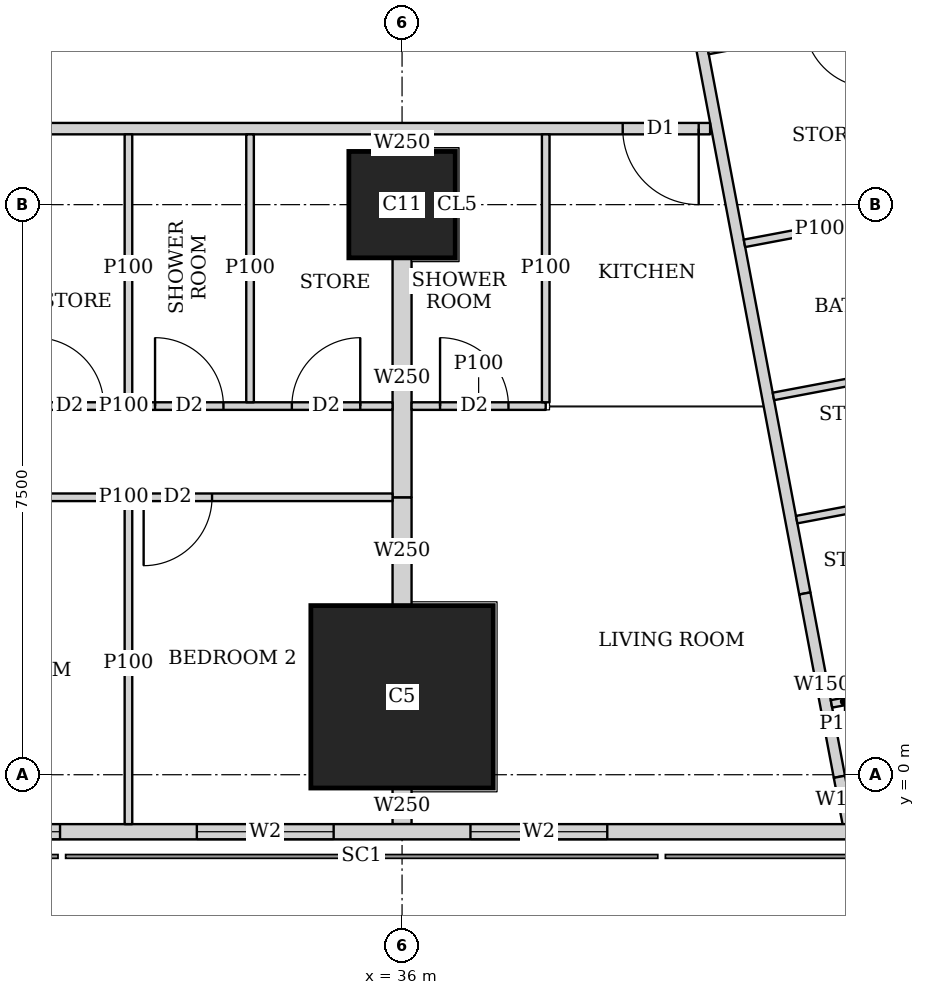
"""IFC4 building model, lengths in metres.
Left out: names, types, materials, properties, quantities, classifications, styles, units other than length and angle.
Written with IfcOpenShell. Run it as: python <this file> out.ifc"""

import sys

from ifc_helpers import new_model, si_unit, direction, frame, frame_2d, origin, origin_2d, place, context, subcontext, project, spatial, rectangle, extrude, element, fill, save


model = new_model("IFC4")
c1 = context("Model", 3, precision=1e-05, world=origin(), true_north=direction((0.0, 1.0)))
c2 = subcontext(c1, "Body", "Model", "MODEL_VIEW")
j1 = project(units=[si_unit("LENGTHUNIT", "METRE"), si_unit("PLANEANGLEUNIT", "RADIAN")], contexts=[c1])
p1 = place(None, origin())
s1 = spatial("IfcSite", under=j1, at=p1, CompositionType="ELEMENT")
p2 = place(p1, origin())
s2 = spatial("IfcBuilding", under=s1, at=p2, CompositionType="ELEMENT")
p3 = place(p2, frame((0.0, 0.0, 204.95)))
s3 = spatial("IfcBuildingStorey", under=s2, at=p3, CompositionType="ELEMENT", Elevation=204.95)
p4 = place(p3, frame((36.0, 1.025, 0.0), z_axis=(0.0, 0.0, 1.0), x_axis=(1.0, 0.0, 0.0)))
e1 = element("IfcColumn", 1, at=p4, inside=s3, PredefinedType="COLUMN", context=c2, shape_type="SweptSolid", body=[
    extrude(rectangle(XDim=2.4, YDim=2.4, at=origin_2d()), origin(), (0.0, 0.0, 1.0), 3.75),
])
p5 = place(p3, frame((36.0, 7.5, 0.0), z_axis=(0.0, 0.0, 1.0), x_axis=(1.0, 0.0, 0.0)))
e2 = element("IfcColumn", 2, at=p5, inside=s3, PredefinedType="COLUMN", context=c2, shape_type="SweptSolid", body=[
    extrude(rectangle(XDim=1.4, YDim=1.4, at=origin_2d()), origin(), (0.0, 0.0, 1.0), 3.75),
])
p6 = place(p3, frame((7.363, -0.75, 0.0), z_axis=(0.0, 0.0, 1.0), x_axis=(1.0, 0.0, 0.0)))
e3 = element("IfcWall", 3, at=p6, inside=s3, PredefinedType="SOLIDWALL", context=c2, shape_type="SweptSolid", body=[
    extrude(rectangle(XDim=40.428, YDim=0.2, at=frame_2d((20.214, 0.0))), origin(), (0.0, 0.0, 1.0), 3.5),
])
p7 = place(p6, frame((2.319, 0.0, 0.9)))
e4 = element("IfcOpeningElement", 4, at=p7, cuts=e3, PredefinedType="OPENING", context=c2, shape_type="SweptSolid", body=[
    extrude(rectangle(XDim=2.4, YDim=1.5, at=frame_2d((1.2, 0.75))), frame((0.0, 0.11, 0.0), z_axis=(0.0, -1.0, 0.0), x_axis=(1.0, 0.0, 0.0)), (0.0, 0.0, 1.0), 0.22),
])
p8 = place(p6, frame((7.937, 0.0, 0.9)))
e5 = element("IfcOpeningElement", 5, at=p8, cuts=e3, PredefinedType="OPENING", context=c2, shape_type="SweptSolid", body=[
    extrude(rectangle(XDim=1.8, YDim=1.5, at=frame_2d((0.9, 0.75))), frame((0.0, 0.11, 0.0), z_axis=(0.0, -1.0, 0.0), x_axis=(1.0, 0.0, 0.0)), (0.0, 0.0, 1.0), 0.22),
])
p9 = place(p6, frame((11.537, 0.0, 0.9)))
e6 = element("IfcOpeningElement", 6, at=p9, cuts=e3, PredefinedType="OPENING", context=c2, shape_type="SweptSolid", body=[
    extrude(rectangle(XDim=1.8, YDim=1.5, at=frame_2d((0.9, 0.75))), frame((0.0, 0.11, 0.0), z_axis=(0.0, -1.0, 0.0), x_axis=(1.0, 0.0, 0.0)), (0.0, 0.0, 1.0), 0.22),
])
p10 = place(p6, frame((15.137, 0.0, 0.9)))
e7 = element("IfcOpeningElement", 7, at=p10, cuts=e3, PredefinedType="OPENING", context=c2, shape_type="SweptSolid", body=[
    extrude(rectangle(XDim=1.8, YDim=1.5, at=frame_2d((0.9, 0.75))), frame((0.0, 0.11, 0.0), z_axis=(0.0, -1.0, 0.0), x_axis=(1.0, 0.0, 0.0)), (0.0, 0.0, 1.0), 0.22),
])
p11 = place(p6, frame((18.737, 0.0, 0.9)))
e8 = element("IfcOpeningElement", 8, at=p11, cuts=e3, PredefinedType="OPENING", context=c2, shape_type="SweptSolid", body=[
    extrude(rectangle(XDim=1.8, YDim=1.5, at=frame_2d((0.9, 0.75))), frame((0.0, 0.11, 0.0), z_axis=(0.0, -1.0, 0.0), x_axis=(1.0, 0.0, 0.0)), (0.0, 0.0, 1.0), 0.22),
])
p12 = place(p6, frame((22.337, 0.0, 0.9)))
e9 = element("IfcOpeningElement", 9, at=p12, cuts=e3, PredefinedType="OPENING", context=c2, shape_type="SweptSolid", body=[
    extrude(rectangle(XDim=1.8, YDim=1.5, at=frame_2d((0.9, 0.75))), frame((0.0, 0.11, 0.0), z_axis=(0.0, -1.0, 0.0), x_axis=(1.0, 0.0, 0.0)), (0.0, 0.0, 1.0), 0.22),
])
p13 = place(p6, frame((25.937, 0.0, 0.9)))
e10 = element("IfcOpeningElement", 10, at=p13, cuts=e3, PredefinedType="OPENING", context=c2, shape_type="SweptSolid", body=[
    extrude(rectangle(XDim=1.8, YDim=1.5, at=frame_2d((0.9, 0.75))), frame((0.0, 0.11, 0.0), z_axis=(0.0, -1.0, 0.0), x_axis=(1.0, 0.0, 0.0)), (0.0, 0.0, 1.0), 0.22),
])
p14 = place(p6, frame((29.537, 0.0, 0.9)))
e11 = element("IfcOpeningElement", 11, at=p14, cuts=e3, PredefinedType="OPENING", context=c2, shape_type="SweptSolid", body=[
    extrude(rectangle(XDim=1.8, YDim=1.5, at=frame_2d((0.9, 0.75))), frame((0.0, 0.11, 0.0), z_axis=(0.0, -1.0, 0.0), x_axis=(1.0, 0.0, 0.0)), (0.0, 0.0, 1.0), 0.22),
])
p15 = place(p3, frame((40.053, 8.5, 0.0), z_axis=(0.0, 0.0, 1.0), x_axis=(-1.0, 0.0, 0.0)))
e12 = element("IfcWall", 12, at=p15, inside=s3, PredefinedType="SOLIDWALL", context=c2, shape_type="SweptSolid", body=[
    extrude(rectangle(XDim=31.052, YDim=0.15, at=frame_2d((15.526, 0.0))), origin(), (0.0, 0.0, 1.0), 3.5),
])
p16 = place(p15, frame((29.178, 0.0, 0.0)))
e13 = element("IfcOpeningElement", 13, at=p16, cuts=e12, PredefinedType="OPENING", context=c2, shape_type="SweptSolid", body=[
    extrude(rectangle(XDim=1.0, YDim=2.1, at=frame_2d((0.5, 1.05))), frame((0.0, 0.085, 0.0), z_axis=(0.0, -1.0, 0.0), x_axis=(1.0, 0.0, 0.0)), (0.0, 0.0, 1.0), 0.17),
])
p17 = place(p15, frame((19.953, 0.0, 0.0)))
e14 = element("IfcOpeningElement", 14, at=p17, cuts=e12, PredefinedType="OPENING", context=c2, shape_type="SweptSolid", body=[
    extrude(rectangle(XDim=1.0, YDim=2.1, at=frame_2d((0.5, 1.05))), frame((0.0, 0.085, 0.0), z_axis=(0.0, -1.0, 0.0), x_axis=(1.0, 0.0, 0.0)), (0.0, 0.0, 1.0), 0.17),
])
p18 = place(p15, frame((12.753, 0.0, 0.0)))
e15 = element("IfcOpeningElement", 15, at=p18, cuts=e12, PredefinedType="OPENING", context=c2, shape_type="SweptSolid", body=[
    extrude(rectangle(XDim=1.0, YDim=2.1, at=frame_2d((0.5, 1.05))), frame((0.0, 0.085, 0.0), z_axis=(0.0, -1.0, 0.0), x_axis=(1.0, 0.0, 0.0)), (0.0, 0.0, 1.0), 0.17),
])
p19 = place(p15, frame((0.15, 0.0, 0.0)))
e16 = element("IfcOpeningElement", 16, at=p19, cuts=e12, PredefinedType="OPENING", context=c2, shape_type="SweptSolid", body=[
    extrude(rectangle(XDim=1.0, YDim=2.1, at=frame_2d((0.5, 1.05))), frame((0.0, 0.085, 0.0), z_axis=(0.0, -1.0, 0.0), x_axis=(1.0, 0.0, 0.0)), (0.0, 0.0, 1.0), 0.17),
])
p20 = place(p3, frame((33.68, 42.723, 0.0), z_axis=(0.0, 0.0, 1.0), x_axis=(0.185601160014, -0.982625162207, 0.0)))
e17 = element("IfcWall", 17, at=p20, inside=s3, PredefinedType="SOLIDWALL", context=c2, shape_type="SweptSolid", body=[
    extrude(rectangle(XDim=41.051, YDim=0.15, at=frame_2d((20.526, 0.0))), origin(), (0.0, 0.0, 1.0), 2.5),
])
p21 = place(p20, frame((12.307, 0.0, 0.0)))
e18 = element("IfcOpeningElement", 18, at=p21, cuts=e17, PredefinedType="OPENING", context=c2, shape_type="SweptSolid", body=[
    extrude(rectangle(XDim=1.0, YDim=2.1, at=frame_2d((0.5, 1.05))), frame((0.0, 0.085, 0.0), z_axis=(0.0, -1.0, 0.0), x_axis=(1.0, 0.0, 0.0)), (0.0, 0.0, 1.0), 0.17),
])
p22 = place(p20, frame((16.123, 0.0, 0.0)))
e19 = element("IfcOpeningElement", 19, at=p22, cuts=e17, PredefinedType="OPENING", context=c2, shape_type="SweptSolid", body=[
    extrude(rectangle(XDim=1.0, YDim=2.1, at=frame_2d((0.5, 1.05))), frame((0.0, 0.085, 0.0), z_axis=(0.0, -1.0, 0.0), x_axis=(1.0, 0.0, 0.0)), (0.0, 0.0, 1.0), 0.17),
])
p23 = place(p20, frame((30.902, 0.0, 0.0)))
e20 = element("IfcOpeningElement", 20, at=p23, cuts=e17, PredefinedType="OPENING", context=c2, shape_type="SweptSolid", body=[
    extrude(rectangle(XDim=1.0, YDim=2.1, at=frame_2d((0.5, 1.05))), frame((0.0, 0.085, 0.0), z_axis=(0.0, -1.0, 0.0), x_axis=(1.0, 0.0, 0.0)), (0.0, 0.0, 1.0), 0.17),
])
p24 = place(p3, frame((41.299, 2.385, 0.0), z_axis=(0.0, 0.0, 1.0), x_axis=(0.18529731833, -0.982682504077, 0.0)))
e21 = element("IfcWall", 21, at=p24, inside=s3, PredefinedType="SOLIDWALL", context=c2, shape_type="SweptSolid", body=[
    extrude(rectangle(XDim=2.455, YDim=0.15, at=frame_2d((1.227, 0.0))), origin(), (0.0, 0.0, 1.0), 2.05),
])
p25 = place(p3, frame((41.754, -0.027, 0.0), z_axis=(0.0, 0.0, 1.0), x_axis=(0.186404157015, -0.982473149886, 0.0)))
e22 = element("IfcWall", 22, at=p25, inside=s3, PredefinedType="SOLIDWALL", context=c2, shape_type="SweptSolid", body=[
    extrude(rectangle(XDim=0.634, YDim=0.15, at=frame_2d((0.317, 0.0))), origin(), (0.0, 0.0, 1.0), 3.5),
])
p26 = place(p3, frame((35.875, 3.65, 0.0), z_axis=(0.0, 0.0, 1.0), x_axis=(-1.0, 0.0, 0.0)))
e23 = element("IfcWall", 23, at=p26, inside=s3, PredefinedType="PARTITIONING", context=c2, shape_type="SweptSolid", body=[
    extrude(rectangle(XDim=7.075, YDim=0.1, at=frame_2d((3.538, 0.0))), origin(), (0.0, 0.0, 1.0), 3.5),
])
p27 = place(p26, frame((4.95, 0.0, 0.0)))
e24 = element("IfcOpeningElement", 24, at=p27, cuts=e23, PredefinedType="OPENING", context=c2, shape_type="SweptSolid", body=[
    extrude(rectangle(XDim=0.9, YDim=2.1, at=frame_2d((0.45, 1.05))), frame((0.0, 0.06, 0.0), z_axis=(0.0, -1.0, 0.0), x_axis=(1.0, 0.0, 0.0)), (0.0, 0.0, 1.0), 0.12),
])
p28 = place(p26, frame((2.375, 0.0, 0.0)))
e25 = element("IfcOpeningElement", 25, at=p28, cuts=e23, PredefinedType="OPENING", context=c2, shape_type="SweptSolid", body=[
    extrude(rectangle(XDim=0.9, YDim=2.1, at=frame_2d((0.45, 1.05))), frame((0.0, 0.06, 0.0), z_axis=(0.0, -1.0, 0.0), x_axis=(1.0, 0.0, 0.0)), (0.0, 0.0, 1.0), 0.12),
])
p29 = place(p3, frame((35.875, 4.85, 0.0), z_axis=(0.0, 0.0, 1.0), x_axis=(-1.0, 0.0, 0.0)))
e26 = element("IfcWall", 26, at=p29, inside=s3, PredefinedType="PARTITIONING", context=c2, shape_type="SweptSolid", body=[
    extrude(rectangle(XDim=7.075, YDim=0.1, at=frame_2d((3.538, 0.0))), origin(), (0.0, 0.0, 1.0), 3.5),
])
p30 = place(p29, frame((5.6, 0.0, 0.0)))
e27 = element("IfcOpeningElement", 27, at=p30, cuts=e26, PredefinedType="OPENING", context=c2, shape_type="SweptSolid", body=[
    extrude(rectangle(XDim=0.9, YDim=2.1, at=frame_2d((0.45, 1.05))), frame((0.0, 0.06, 0.0), z_axis=(0.0, -1.0, 0.0), x_axis=(1.0, 0.0, 0.0)), (0.0, 0.0, 1.0), 0.12),
])
p31 = place(p29, frame((2.225, 0.0, 0.0)))
e28 = element("IfcOpeningElement", 28, at=p31, cuts=e26, PredefinedType="OPENING", context=c2, shape_type="SweptSolid", body=[
    extrude(rectangle(XDim=0.9, YDim=2.1, at=frame_2d((0.45, 1.05))), frame((0.0, 0.06, 0.0), z_axis=(0.0, -1.0, 0.0), x_axis=(1.0, 0.0, 0.0)), (0.0, 0.0, 1.0), 0.12),
])
p32 = place(p29, frame((3.8, 0.0, 0.0)))
e29 = element("IfcOpeningElement", 29, at=p32, cuts=e26, PredefinedType="OPENING", context=c2, shape_type="SweptSolid", body=[
    extrude(rectangle(XDim=0.9, YDim=2.1, at=frame_2d((0.45, 1.05))), frame((0.0, 0.06, 0.0), z_axis=(0.0, -1.0, 0.0), x_axis=(1.0, 0.0, 0.0)), (0.0, 0.0, 1.0), 0.12),
])
p33 = place(p29, frame((0.425, 0.0, 0.0)))
e30 = element("IfcOpeningElement", 30, at=p33, cuts=e26, PredefinedType="OPENING", context=c2, shape_type="SweptSolid", body=[
    extrude(rectangle(XDim=0.9, YDim=2.1, at=frame_2d((0.45, 1.05))), frame((0.0, 0.06, 0.0), z_axis=(0.0, -1.0, 0.0), x_axis=(1.0, 0.0, 0.0)), (0.0, 0.0, 1.0), 0.12),
])
p34 = place(p3, frame((32.4, -0.65, 0.0), z_axis=(0.0, 0.0, 1.0), x_axis=(0.0, 1.0, 0.0)))
e31 = element("IfcWall", 31, at=p34, inside=s3, PredefinedType="PARTITIONING", context=c2, shape_type="SweptSolid", body=[
    extrude(rectangle(XDim=4.25, YDim=0.1, at=frame_2d((2.125, 0.0))), origin(), (0.0, 0.0, 1.0), 2.05),
])
for number, where, z_axis, x_axis in (
    (32, (32.4, 4.9, 0.0), (0.0, 0.0, 1.0), (0.0, 1.0, 0.0)),
    (33, (34.0, 4.9, 0.0), (0.0, 0.0, 1.0), (0.0, 1.0, 0.0)),
):
    element("IfcWall", number, at=place(p3, frame(where, z_axis=z_axis, x_axis=x_axis)), inside=s3, PredefinedType="PARTITIONING", context=c2, shape_type="SweptSolid", body=[
        extrude(rectangle(XDim=3.525, YDim=0.1, at=frame_2d((1.763, 0.0))), origin(), (0.0, 0.0, 1.0), 3.5),
    ])
p35 = place(p3, frame((37.89, 4.85, 0.0), z_axis=(0.0, 0.0, 1.0), x_axis=(-1.0, 0.0, 0.0)))
e34 = element("IfcWall", 34, at=p35, inside=s3, PredefinedType="PARTITIONING", context=c2, shape_type="SweptSolid", body=[
    extrude(rectangle(XDim=1.765, YDim=0.1, at=frame_2d((0.882, 0.0))), origin(), (0.0, 0.0, 1.0), 3.5),
])
p36 = place(p35, frame((0.49, 0.0, 0.0)))
e35 = element("IfcOpeningElement", 35, at=p36, cuts=e34, PredefinedType="OPENING", context=c2, shape_type="SweptSolid", body=[
    extrude(rectangle(XDim=0.9, YDim=2.1, at=frame_2d((0.45, 1.05))), frame((0.0, 0.06, 0.0), z_axis=(0.0, -1.0, 0.0), x_axis=(1.0, 0.0, 0.0)), (0.0, 0.0, 1.0), 0.12),
])
p37 = place(p3, frame((37.89, 4.9, 0.0), z_axis=(0.0, 0.0, 1.0), x_axis=(0.0, 1.0, 0.0)))
e36 = element("IfcWall", 36, at=p37, inside=s3, PredefinedType="PARTITIONING", context=c2, shape_type="SweptSolid", body=[
    extrude(rectangle(XDim=3.525, YDim=0.1, at=frame_2d((1.763, 0.0))), origin(), (0.0, 0.0, 1.0), 3.5),
])
p38 = place(p3, frame((36.0, -0.65, 0.0), z_axis=(0.0, 0.0, 1.0), x_axis=(0.0, 1.0, 0.0)))
e37 = element("IfcWall", 37, at=p38, inside=s3, PredefinedType="SOLIDWALL", context=c2, shape_type="SweptSolid", body=[
    extrude(rectangle(XDim=0.474, YDim=0.25, at=frame_2d((0.237, 0.0))), origin(), (0.0, 0.0, 1.0), 2.05),
])
p39 = place(p3, frame((36.0, 2.226, 0.0), z_axis=(0.0, 0.0, 1.0), x_axis=(0.0, 1.0, 0.0)))
e38 = element("IfcWall", 38, at=p39, inside=s3, PredefinedType="SOLIDWALL", context=c2, shape_type="SweptSolid", body=[
    extrude(rectangle(XDim=1.424, YDim=0.25, at=frame_2d((0.712, 0.0))), origin(), (0.0, 0.0, 1.0), 2.05),
])
p40 = place(p3, frame((36.0, 3.65, 0.0), z_axis=(0.0, 0.0, 1.0), x_axis=(0.0, 1.0, 0.0)))
e39 = element("IfcWall", 39, at=p40, inside=s3, PredefinedType="SOLIDWALL", context=c2, shape_type="SweptSolid", body=[
    extrude(rectangle(XDim=3.149, YDim=0.25, at=frame_2d((1.575, 0.0))), origin(), (0.0, 0.0, 1.0), 3.5),
])
p41 = place(p3, frame((36.0, 8.201, 0.0), z_axis=(0.0, 0.0, 1.0), x_axis=(0.0, 1.0, 0.0)))
e40 = element("IfcWall", 40, at=p41, inside=s3, PredefinedType="SOLIDWALL", context=c2, shape_type="SweptSolid", body=[
    extrude(rectangle(XDim=0.224, YDim=0.25, at=frame_2d((0.112, 0.0))), origin(), (0.0, 0.0, 1.0), 3.5),
])
p42 = place(p3, frame((43.49, 10.183, 0.0), z_axis=(0.0, 0.0, 1.0), x_axis=(-0.982588017646, -0.185797706064, 0.0)))
e41 = element("IfcWall", 41, at=p42, inside=s3, PredefinedType="PARTITIONING", context=c2, shape_type="SweptSolid", body=[
    extrude(rectangle(XDim=3.525, YDim=0.1, at=frame_2d((1.763, 0.0))), origin(), (0.0, 0.0, 1.0), 3.5),
])
p43 = place(p42, frame((1.325, 0.0, 0.0)))
e42 = element("IfcOpeningElement", 42, at=p43, cuts=e41, PredefinedType="OPENING", context=c2, shape_type="SweptSolid", body=[
    extrude(rectangle(XDim=0.9, YDim=2.1, at=frame_2d((0.45, 1.05))), frame((0.0, 0.06, 0.0), z_axis=(0.0, -1.0, 0.0), x_axis=(1.0, 0.0, 0.0)), (0.0, 0.0, 1.0), 0.12),
])
p44 = place(p3, frame((42.49, 7.366, 0.0), z_axis=(0.0, 0.0, 1.0), x_axis=(-0.982620917875, -0.185623629302, 0.0)))
e43 = element("IfcWall", 43, at=p44, inside=s3, PredefinedType="PARTITIONING", context=c2, shape_type="SweptSolid", body=[
    extrude(rectangle(XDim=2.02, YDim=0.1, at=frame_2d((1.01, 0.0))), origin(), (0.0, 0.0, 1.0), 3.5),
])
p45 = place(p3, frame((41.99, 0.996, 0.0), z_axis=(0.0, 0.0, 1.0), x_axis=(-0.982639822555, -0.185523527159, 0.0)))
e44 = element("IfcWall", 44, at=p45, inside=s3, PredefinedType="PARTITIONING", context=c2, shape_type="SweptSolid", body=[
    extrude(rectangle(XDim=0.346, YDim=0.1, at=frame_2d((0.173, 0.0))), origin(), (0.0, 0.0, 1.0), 2.05),
])
p46 = place(p3, frame((44.35, 5.631, 0.0), z_axis=(0.0, 0.0, 1.0), x_axis=(-0.982638553676, -0.185530247748, 0.0)))
e45 = element("IfcWall", 45, at=p46, inside=s3, PredefinedType="PARTITIONING", context=c2, shape_type="SweptSolid", body=[
    extrude(rectangle(XDim=3.525, YDim=0.1, at=frame_2d((1.763, 0.0))), origin(), (0.0, 0.0, 1.0), 3.5),
])
p47 = place(p3, frame((41.192, 3.356, 0.0), z_axis=(0.0, 0.0, 1.0), x_axis=(0.982588017646, 0.185797706064, 0.0)))
e46 = element("IfcWall", 46, at=p47, inside=s3, PredefinedType="PARTITIONING", context=c2, shape_type="SweptSolid", body=[
    extrude(rectangle(XDim=3.525, YDim=0.1, at=frame_2d((1.763, 0.0))), origin(), (0.0, 0.0, 1.0), 3.5),
])
p48 = place(p47, frame((1.7, 0.0, 0.0)))
e47 = element("IfcOpeningElement", 47, at=p48, cuts=e46, PredefinedType="OPENING", context=c2, shape_type="SweptSolid", body=[
    extrude(rectangle(XDim=0.9, YDim=2.1, at=frame_2d((0.45, 1.05))), frame((0.0, 0.06, 0.0), z_axis=(0.0, -1.0, 0.0), x_axis=(1.0, 0.0, 0.0)), (0.0, 0.0, 1.0), 0.12),
])
p49 = place(p12, origin())
e48 = element("IfcWindow", 48, at=p49, inside=s3, PartitioningType="SINGLE_PANEL", PredefinedType="WINDOW", context=c2, shape_type="SweptSolid", body=[
    extrude(rectangle(XDim=1.8, YDim=1.5, at=frame_2d((0.9, 0.75))), frame((0.0, 0.03, 0.0), z_axis=(0.0, -1.0, 0.0), x_axis=(1.0, 0.0, 0.0)), (0.0, 0.0, 1.0), 0.06),
])
fill(e9, e48)
p50 = place(p13, origin())
e49 = element("IfcWindow", 49, at=p50, inside=s3, PartitioningType="SINGLE_PANEL", PredefinedType="WINDOW", context=c2, shape_type="SweptSolid", body=[
    extrude(rectangle(XDim=1.8, YDim=1.5, at=frame_2d((0.9, 0.75))), frame((0.0, 0.03, 0.0), z_axis=(0.0, -1.0, 0.0), x_axis=(1.0, 0.0, 0.0)), (0.0, 0.0, 1.0), 0.06),
])
fill(e10, e49)
p51 = place(p14, origin())
e50 = element("IfcWindow", 50, at=p51, inside=s3, PartitioningType="SINGLE_PANEL", PredefinedType="WINDOW", context=c2, shape_type="SweptSolid", body=[
    extrude(rectangle(XDim=1.8, YDim=1.5, at=frame_2d((0.9, 0.75))), frame((0.0, 0.03, 0.0), z_axis=(0.0, -1.0, 0.0), x_axis=(1.0, 0.0, 0.0)), (0.0, 0.0, 1.0), 0.06),
])
fill(e11, e50)
p52 = place(p28, origin())
e51 = element("IfcDoor", 51, at=p52, inside=s3, OperationType="SINGLE_SWING_RIGHT", PredefinedType="DOOR", context=c2, shape_type="SweptSolid", body=[
    extrude(rectangle(XDim=0.9, YDim=2.1, at=frame_2d((0.45, 1.05))), frame((0.0, 0.025, 0.0), z_axis=(0.0, -1.0, 0.0), x_axis=(1.0, 0.0, 0.0)), (0.0, 0.0, 1.0), 0.05),
])
fill(e25, e51)
p53 = place(p31, origin())
e52 = element("IfcDoor", 52, at=p53, inside=s3, OperationType="SINGLE_SWING_LEFT", PredefinedType="DOOR", context=c2, shape_type="SweptSolid", body=[
    extrude(rectangle(XDim=0.9, YDim=2.1, at=frame_2d((0.45, 1.05))), frame((0.0, 0.025, 0.0), z_axis=(0.0, -1.0, 0.0), x_axis=(1.0, 0.0, 0.0)), (0.0, 0.0, 1.0), 0.05),
])
fill(e28, e52)
p54 = place(p32, origin())
e53 = element("IfcDoor", 53, at=p54, inside=s3, OperationType="SINGLE_SWING_LEFT", PredefinedType="DOOR", context=c2, shape_type="SweptSolid", body=[
    extrude(rectangle(XDim=0.9, YDim=2.1, at=frame_2d((0.45, 1.05))), frame((0.0, 0.025, 0.0), z_axis=(0.0, -1.0, 0.0), x_axis=(1.0, 0.0, 0.0)), (0.0, 0.0, 1.0), 0.05),
])
fill(e29, e53)
p55 = place(p33, origin())
e54 = element("IfcDoor", 54, at=p55, inside=s3, OperationType="SINGLE_SWING_RIGHT", PredefinedType="DOOR", context=c2, shape_type="SweptSolid", body=[
    extrude(rectangle(XDim=0.9, YDim=2.1, at=frame_2d((0.45, 1.05))), frame((0.0, 0.025, 0.0), z_axis=(0.0, -1.0, 0.0), x_axis=(1.0, 0.0, 0.0)), (0.0, 0.0, 1.0), 0.05),
])
fill(e30, e54)
p56 = place(p36, origin())
e55 = element("IfcDoor", 55, at=p56, inside=s3, OperationType="SINGLE_SWING_LEFT", PredefinedType="DOOR", context=c2, shape_type="SweptSolid", body=[
    extrude(rectangle(XDim=0.9, YDim=2.1, at=frame_2d((0.45, 1.05))), frame((0.0, 0.025, 0.0), z_axis=(0.0, -1.0, 0.0), x_axis=(1.0, 0.0, 0.0)), (0.0, 0.0, 1.0), 0.05),
])
fill(e35, e55)
p57 = place(p19, origin())
e56 = element("IfcDoor", 56, at=p57, inside=s3, OperationType="SINGLE_SWING_LEFT", PredefinedType="DOOR", context=c2, shape_type="SweptSolid", body=[
    extrude(rectangle(XDim=1.0, YDim=2.1, at=frame_2d((0.5, 1.05))), frame((0.0, 0.025, 0.0), z_axis=(0.0, -1.0, 0.0), x_axis=(1.0, 0.0, 0.0)), (0.0, 0.0, 1.0), 0.05),
])
fill(e16, e56)
save(model, sys.argv[1])
